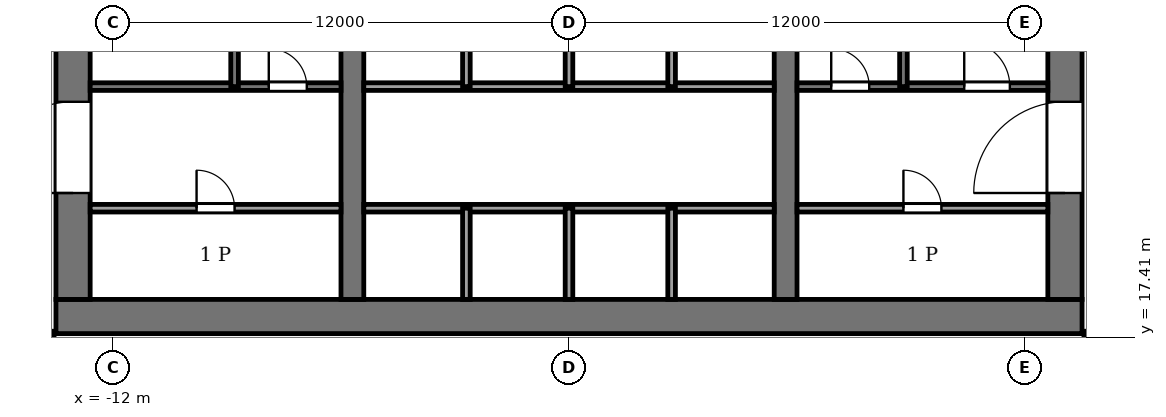
"""IFC4 building model, lengths in metres.
Left out: names, types, materials, properties, quantities, classifications, styles, units other than length and angle.
Written with IfcOpenShell. Run it as: python <this file> out.ifc"""

import sys

from ifc_helpers import new_model, si_unit, direction, frame, frame_2d, origin, place, context, subcontext, project, spatial, rectangle, extrude, element, fill, save


model = new_model("IFC4")
c1 = context("Model", 3, precision=1e-05, world=origin(), true_north=direction((0.0, 1.0)))
c2 = subcontext(c1, "Body", "Model", "MODEL_VIEW")
j1 = project(units=[si_unit("LENGTHUNIT", "METRE"), si_unit("PLANEANGLEUNIT", "RADIAN")], contexts=[c1])
p1 = place(None, origin())
s1 = spatial("IfcSite", under=j1, at=p1, CompositionType="ELEMENT")
p2 = place(p1, origin())
s2 = spatial("IfcBuilding", under=s1, at=p2, CompositionType="ELEMENT")
p3 = place(p2, frame((0.0, 0.0, 226.0)))
s3 = spatial("IfcBuildingStorey", under=s2, at=p3, CompositionType="ELEMENT", Elevation=226.0)
p4 = place(p3, frame((-13.5, 17.95, -0.25), z_axis=(0.0, 0.0, 1.0), x_axis=(1.0, 0.0, 0.0)))
e1 = element("IfcWall", 1, at=p4, inside=s3, PredefinedType="SHEAR", context=c2, shape_type="SweptSolid", body=[
    extrude(rectangle(XDim=27.0, YDim=0.9, at=frame_2d((13.5, 0.0))), origin(), (0.0, 0.0, 1.0), 7.12),
])
p5 = place(p3, frame((-13.05, 18.4, -0.25), z_axis=(0.0, 0.0, 1.0), x_axis=(0.0, 1.0, 0.0)))
e2 = element("IfcWall", 2, at=p5, inside=s3, PredefinedType="SHEAR", context=c2, shape_type="SweptSolid", body=[
    extrude(rectangle(XDim=19.2, YDim=0.9, at=frame_2d((9.6, 0.0))), origin(), (0.0, 0.0, 1.0), 7.12),
])
p6 = place(p5, frame((2.8, 0.0, 0.25)))
e3 = element("IfcOpeningElement", 3, at=p6, cuts=e2, PredefinedType="OPENING", context=c2, shape_type="SweptSolid", body=[
    extrude(rectangle(XDim=2.4, YDim=2.4, at=frame_2d((1.2, 1.2))), frame((0.0, 0.46, 0.0), z_axis=(0.0, -1.0, 0.0), x_axis=(1.0, 0.0, 0.0)), (0.0, 0.0, 1.0), 0.92),
])
p7 = place(p5, frame((13.4, 0.0, 0.25)))
e4 = element("IfcOpeningElement", 4, at=p7, cuts=e2, PredefinedType="OPENING", context=c2, shape_type="SweptSolid", body=[
    extrude(rectangle(XDim=1.4, YDim=2.2, at=frame_2d((0.7, 1.1))), frame((0.0, 0.46, 0.0), z_axis=(0.0, -1.0, 0.0), x_axis=(1.0, 0.0, 0.0)), (0.0, 0.0, 1.0), 0.92),
])
p8 = place(p3, frame((13.05, 18.4, -0.25), z_axis=(0.0, 0.0, 1.0), x_axis=(0.0, 1.0, 0.0)))
e5 = element("IfcWall", 5, at=p8, inside=s3, PredefinedType="SHEAR", context=c2, shape_type="SweptSolid", body=[
    extrude(rectangle(XDim=19.2, YDim=0.9, at=frame_2d((9.6, 0.0))), origin(), (0.0, 0.0, 1.0), 7.12),
])
p9 = place(p8, frame((2.8, 0.0, 0.25)))
e6 = element("IfcOpeningElement", 6, at=p9, cuts=e5, PredefinedType="OPENING", context=c2, shape_type="SweptSolid", body=[
    extrude(rectangle(XDim=2.4, YDim=2.4, at=frame_2d((1.2, 1.2))), frame((0.0, 0.46, 0.0), z_axis=(0.0, -1.0, 0.0), x_axis=(1.0, 0.0, 0.0)), (0.0, 0.0, 1.0), 0.92),
])
p10 = place(p8, frame((13.3, 0.0, 0.25)))
e7 = element("IfcOpeningElement", 7, at=p10, cuts=e5, PredefinedType="OPENING", context=c2, shape_type="SweptSolid", body=[
    extrude(rectangle(XDim=2.4, YDim=2.4, at=frame_2d((1.2, 1.2))), frame((0.0, 0.46, 0.0), z_axis=(0.0, -1.0, 0.0), x_axis=(1.0, 0.0, 0.0)), (0.0, 0.0, 1.0), 0.92),
])
p11 = place(p3, frame((-5.7, 18.4, -0.25), z_axis=(0.0, 0.0, 1.0), x_axis=(0.0, 1.0, 0.0)))
e8 = element("IfcWall", 8, at=p11, inside=s3, PredefinedType="SHEAR", context=c2, shape_type="SweptSolid", body=[
    extrude(rectangle(XDim=19.2, YDim=0.6, at=frame_2d((9.6, 0.0))), origin(), (0.0, 0.0, 1.0), 7.12),
])
p12 = place(p11, frame((8.35, 0.0, 0.25)))
e9 = element("IfcOpeningElement", 9, at=p12, cuts=e8, PredefinedType="OPENING", context=c2, shape_type="SweptSolid", body=[
    extrude(rectangle(XDim=0.9, YDim=2.1, at=frame_2d((0.45, 1.05))), frame((0.0, 0.31, 0.0), z_axis=(0.0, -1.0, 0.0), x_axis=(1.0, 0.0, 0.0)), (0.0, 0.0, 1.0), 0.62),
])
p13 = place(p3, frame((5.7, 18.4, -0.25), z_axis=(0.0, 0.0, 1.0), x_axis=(0.0, 1.0, 0.0)))
e10 = element("IfcWall", 10, at=p13, inside=s3, PredefinedType="SHEAR", context=c2, shape_type="SweptSolid", body=[
    extrude(rectangle(XDim=19.2, YDim=0.6, at=frame_2d((9.6, 0.0))), origin(), (0.0, 0.0, 1.0), 7.12),
])
p14 = place(p13, frame((13.3, 0.0, 0.25)))
e11 = element("IfcOpeningElement", 11, at=p14, cuts=e10, PredefinedType="OPENING", context=c2, shape_type="SweptSolid", body=[
    extrude(rectangle(XDim=2.4, YDim=2.4, at=frame_2d((1.2, 1.2))), frame((0.0, 0.31, 0.0), z_axis=(0.0, -1.0, 0.0), x_axis=(1.0, 0.0, 0.0)), (0.0, 0.0, 1.0), 0.62),
])
p15 = place(p3, frame((-12.6, 20.8, 0.0), z_axis=(0.0, 0.0, 1.0), x_axis=(1.0, 0.0, 0.0)))
e12 = element("IfcWall", 12, at=p15, inside=s3, PredefinedType="PARTITIONING", context=c2, shape_type="SweptSolid", body=[
    extrude(rectangle(XDim=6.6, YDim=0.2, at=frame_2d((3.3, 0.0))), origin(), (0.0, 0.0, 1.0), 6.87),
])
p16 = place(p15, frame((2.8, 0.0, 0.0)))
e13 = element("IfcOpeningElement", 13, at=p16, cuts=e12, PredefinedType="OPENING", context=c2, shape_type="SweptSolid", body=[
    extrude(rectangle(XDim=1.0, YDim=2.1, at=frame_2d((0.5, 1.05))), frame((0.0, 0.11, 0.0), z_axis=(0.0, -1.0, 0.0), x_axis=(1.0, 0.0, 0.0)), (0.0, 0.0, 1.0), 0.22),
])
p17 = place(p3, frame((-5.4, 20.8, 0.0), z_axis=(0.0, 0.0, 1.0), x_axis=(1.0, 0.0, 0.0)))
e14 = element("IfcWall", 14, at=p17, inside=s3, PredefinedType="PARTITIONING", context=c2, shape_type="SweptSolid", body=[
    extrude(rectangle(XDim=10.8, YDim=0.2, at=frame_2d((5.4, 0.0))), origin(), (0.0, 0.0, 1.0), 6.87),
])
p18 = place(p3, frame((6.0, 20.8, 0.0), z_axis=(0.0, 0.0, 1.0), x_axis=(1.0, 0.0, 0.0)))
e15 = element("IfcWall", 15, at=p18, inside=s3, PredefinedType="PARTITIONING", context=c2, shape_type="SweptSolid", body=[
    extrude(rectangle(XDim=6.6, YDim=0.2, at=frame_2d((3.3, 0.0))), origin(), (0.0, 0.0, 1.0), 6.87),
])
p19 = place(p18, frame((2.8, 0.0, 0.0)))
e16 = element("IfcOpeningElement", 16, at=p19, cuts=e15, PredefinedType="OPENING", context=c2, shape_type="SweptSolid", body=[
    extrude(rectangle(XDim=1.0, YDim=2.1, at=frame_2d((0.5, 1.05))), frame((0.0, 0.11, 0.0), z_axis=(0.0, -1.0, 0.0), x_axis=(1.0, 0.0, 0.0)), (0.0, 0.0, 1.0), 0.22),
])
p20 = place(p3, frame((-12.6, 24.0, 0.0), z_axis=(0.0, 0.0, 1.0), x_axis=(1.0, 0.0, 0.0)))
e17 = element("IfcWall", 17, at=p20, inside=s3, PredefinedType="PARTITIONING", context=c2, shape_type="SweptSolid", body=[
    extrude(rectangle(XDim=6.6, YDim=0.2, at=frame_2d((3.3, 0.0))), origin(), (0.0, 0.0, 1.0), 6.87),
])
p21 = place(p20, frame((4.7, 0.0, 0.0)))
e18 = element("IfcOpeningElement", 18, at=p21, cuts=e17, PredefinedType="OPENING", context=c2, shape_type="SweptSolid", body=[
    extrude(rectangle(XDim=1.0, YDim=2.1, at=frame_2d((0.5, 1.05))), frame((0.0, 0.11, 0.0), z_axis=(0.0, -1.0, 0.0), x_axis=(1.0, 0.0, 0.0)), (0.0, 0.0, 1.0), 0.22),
])
p22 = place(p3, frame((-5.4, 24.0, 0.0), z_axis=(0.0, 0.0, 1.0), x_axis=(1.0, 0.0, 0.0)))
e19 = element("IfcWall", 19, at=p22, inside=s3, PredefinedType="PARTITIONING", context=c2, shape_type="SweptSolid", body=[
    extrude(rectangle(XDim=10.8, YDim=0.2, at=frame_2d((5.4, 0.0))), origin(), (0.0, 0.0, 1.0), 6.87),
])
p23 = place(p3, frame((6.0, 24.0, 0.0), z_axis=(0.0, 0.0, 1.0), x_axis=(1.0, 0.0, 0.0)))
e20 = element("IfcWall", 20, at=p23, inside=s3, PredefinedType="PARTITIONING", context=c2, shape_type="SweptSolid", body=[
    extrude(rectangle(XDim=6.6, YDim=0.2, at=frame_2d((3.3, 0.0))), origin(), (0.0, 0.0, 1.0), 6.87),
])
p24 = place(p23, frame((0.9, 0.0, 0.0)))
e21 = element("IfcOpeningElement", 21, at=p24, cuts=e20, PredefinedType="OPENING", context=c2, shape_type="SweptSolid", body=[
    extrude(rectangle(XDim=1.0, YDim=2.1, at=frame_2d((0.5, 1.05))), frame((0.0, 0.11, 0.0), z_axis=(0.0, -1.0, 0.0), x_axis=(1.0, 0.0, 0.0)), (0.0, 0.0, 1.0), 0.22),
])
p25 = place(p23, frame((4.4, 0.0, 0.0)))
e22 = element("IfcOpeningElement", 22, at=p25, cuts=e20, PredefinedType="OPENING", context=c2, shape_type="SweptSolid", body=[
    extrude(rectangle(XDim=1.2, YDim=2.2, at=frame_2d((0.6, 1.1))), frame((0.0, 0.11, 0.0), z_axis=(0.0, -1.0, 0.0), x_axis=(1.0, 0.0, 0.0)), (0.0, 0.0, 1.0), 0.22),
])
p26 = place(p3, frame((-8.8, 24.0, 0.0), z_axis=(0.0, 0.0, 1.0), x_axis=(0.0, 1.0, 0.0)))
e23 = element("IfcWall", 23, at=p26, inside=s3, PredefinedType="PARTITIONING", context=c2, shape_type="SweptSolid", body=[
    extrude(rectangle(XDim=7.4, YDim=0.2, at=frame_2d((3.7, 0.0))), origin(), (0.0, 0.0, 1.0), 6.87),
])
p27 = place(p3, frame((-2.7, 18.4, 0.0), z_axis=(0.0, 0.0, 1.0), x_axis=(0.0, 1.0, 0.0)))
e24 = element("IfcWall", 24, at=p27, inside=s3, PredefinedType="PARTITIONING", context=c2, shape_type="SweptSolid", body=[
    extrude(rectangle(XDim=2.4, YDim=0.2, at=frame_2d((1.2, 0.0))), origin(), (0.0, 0.0, 1.0), 6.87),
])
p28 = place(p3, frame((-2.7, 24.0, 0.0), z_axis=(0.0, 0.0, 1.0), x_axis=(0.0, 1.0, 0.0)))
e25 = element("IfcWall", 25, at=p28, inside=s3, PredefinedType="PARTITIONING", context=c2, shape_type="SweptSolid", body=[
    extrude(rectangle(XDim=2.4, YDim=0.2, at=frame_2d((1.2, 0.0))), origin(), (0.0, 0.0, 1.0), 6.87),
])
p29 = place(p3, frame((0.0, 18.4, 0.0), z_axis=(0.0, 0.0, 1.0), x_axis=(0.0, 1.0, 0.0)))
e26 = element("IfcWall", 26, at=p29, inside=s3, PredefinedType="PARTITIONING", context=c2, shape_type="SweptSolid", body=[
    extrude(rectangle(XDim=2.4, YDim=0.2, at=frame_2d((1.2, 0.0))), origin(), (0.0, 0.0, 1.0), 6.87),
])
p30 = place(p3, frame((0.0, 24.0, 0.0), z_axis=(0.0, 0.0, 1.0), x_axis=(0.0, 1.0, 0.0)))
e27 = element("IfcWall", 27, at=p30, inside=s3, PredefinedType="PARTITIONING", context=c2, shape_type="SweptSolid", body=[
    extrude(rectangle(XDim=2.4, YDim=0.2, at=frame_2d((1.2, 0.0))), origin(), (0.0, 0.0, 1.0), 6.87),
])
p31 = place(p3, frame((2.7, 18.4, 0.0), z_axis=(0.0, 0.0, 1.0), x_axis=(0.0, 1.0, 0.0)))
e28 = element("IfcWall", 28, at=p31, inside=s3, PredefinedType="PARTITIONING", context=c2, shape_type="SweptSolid", body=[
    extrude(rectangle(XDim=2.4, YDim=0.2, at=frame_2d((1.2, 0.0))), origin(), (0.0, 0.0, 1.0), 6.87),
])
p32 = place(p3, frame((2.7, 24.0, 0.0), z_axis=(0.0, 0.0, 1.0), x_axis=(0.0, 1.0, 0.0)))
e29 = element("IfcWall", 29, at=p32, inside=s3, PredefinedType="PARTITIONING", context=c2, shape_type="SweptSolid", body=[
    extrude(rectangle(XDim=2.4, YDim=0.2, at=frame_2d((1.2, 0.0))), origin(), (0.0, 0.0, 1.0), 6.87),
])
p33 = place(p3, frame((8.8, 24.0, 0.0), z_axis=(0.0, 0.0, 1.0), x_axis=(0.0, 1.0, 0.0)))
e30 = element("IfcWall", 30, at=p33, inside=s3, PredefinedType="PARTITIONING", context=c2, shape_type="SweptSolid", body=[
    extrude(rectangle(XDim=7.4, YDim=0.2, at=frame_2d((3.7, 0.0))), origin(), (0.0, 0.0, 1.0), 6.87),
])
for number, where, z_axis, x_axis in (
    (31, (15.698, 17.5, 0.0), (0.0, 0.0, 1.0), (-1.0, 0.0, 0.0)),
    (32, (-13.55, 17.5, 0.0), (0.0, 0.0, 1.0), (-1.0, 0.0, 0.0)),
):
    element("IfcWall", number, at=place(p3, frame(where, z_axis=z_axis, x_axis=x_axis)), inside=s3, PredefinedType="PARTITIONING", context=c2, shape_type="SweptSolid", body=[
        extrude(rectangle(XDim=2.148, YDim=0.125, at=frame_2d((1.074, 0.0))), origin(), (0.0, 0.0, 1.0), 6.14),
    ])
p34 = place(p16, origin())
e33 = element("IfcDoor", 33, at=p34, inside=s3, OperationType="SINGLE_SWING_RIGHT", PredefinedType="DOOR", context=c2, shape_type="SweptSolid", body=[
    extrude(rectangle(XDim=1.0, YDim=2.1, at=frame_2d((0.5, 1.05))), frame((0.0, 0.025, 0.0), z_axis=(0.0, -1.0, 0.0), x_axis=(1.0, 0.0, 0.0)), (0.0, 0.0, 1.0), 0.05),
])
fill(e13, e33)
p35 = place(p19, origin())
e34 = element("IfcDoor", 34, at=p35, inside=s3, OperationType="SINGLE_SWING_LEFT", PredefinedType="DOOR", context=c2, shape_type="SweptSolid", body=[
    extrude(rectangle(XDim=1.0, YDim=2.1, at=frame_2d((0.5, 1.05))), frame((0.0, 0.025, 0.0), z_axis=(0.0, -1.0, 0.0), x_axis=(1.0, 0.0, 0.0)), (0.0, 0.0, 1.0), 0.05),
])
fill(e16, e34)
p36 = place(p21, origin())
e35 = element("IfcDoor", 35, at=p36, inside=s3, OperationType="SINGLE_SWING_LEFT", PredefinedType="DOOR", context=c2, shape_type="SweptSolid", body=[
    extrude(rectangle(XDim=1.0, YDim=2.1, at=frame_2d((0.5, 1.05))), frame((0.0, 0.025, 0.0), z_axis=(0.0, -1.0, 0.0), x_axis=(1.0, 0.0, 0.0)), (0.0, 0.0, 1.0), 0.05),
])
fill(e18, e35)
p37 = place(p24, origin())
e36 = element("IfcDoor", 36, at=p37, inside=s3, OperationType="SINGLE_SWING_RIGHT", PredefinedType="DOOR", context=c2, shape_type="SweptSolid", body=[
    extrude(rectangle(XDim=1.0, YDim=2.1, at=frame_2d((0.5, 1.05))), frame((0.0, 0.025, 0.0), z_axis=(0.0, -1.0, 0.0), x_axis=(1.0, 0.0, 0.0)), (0.0, 0.0, 1.0), 0.05),
])
fill(e21, e36)
p38 = place(p25, origin())
e37 = element("IfcDoor", 37, at=p38, inside=s3, OperationType="SINGLE_SWING_RIGHT", PredefinedType="DOOR", context=c2, shape_type="SweptSolid", body=[
    extrude(rectangle(XDim=1.2, YDim=2.2, at=frame_2d((0.6, 1.1))), frame((0.0, 0.025, 0.0), z_axis=(0.0, -1.0, 0.0), x_axis=(1.0, 0.0, 0.0)), (0.0, 0.0, 1.0), 0.05),
])
fill(e22, e37)
p39 = place(p6, origin())
e38 = element("IfcDoor", 38, at=p39, inside=s3, OperationType="DOUBLE_DOOR_SINGLE_SWING", PredefinedType="DOOR", context=c2, shape_type="SweptSolid", body=[
    extrude(rectangle(XDim=2.4, YDim=2.4, at=frame_2d((1.2, 1.2))), frame((0.0, 0.025, 0.0), z_axis=(0.0, -1.0, 0.0), x_axis=(1.0, 0.0, 0.0)), (0.0, 0.0, 1.0), 0.05),
])
fill(e3, e38)
p40 = place(p9, origin())
e39 = element("IfcDoor", 39, at=p40, inside=s3, OperationType="DOUBLE_DOOR_SINGLE_SWING", PredefinedType="DOOR", context=c2, shape_type="SweptSolid", body=[
    extrude(rectangle(XDim=2.4, YDim=2.4, at=frame_2d((1.2, 1.2))), frame((0.0, 0.025, 0.0), z_axis=(0.0, -1.0, 0.0), x_axis=(1.0, 0.0, 0.0)), (0.0, 0.0, 1.0), 0.05),
])
fill(e6, e39)
save(model, sys.argv[1])
